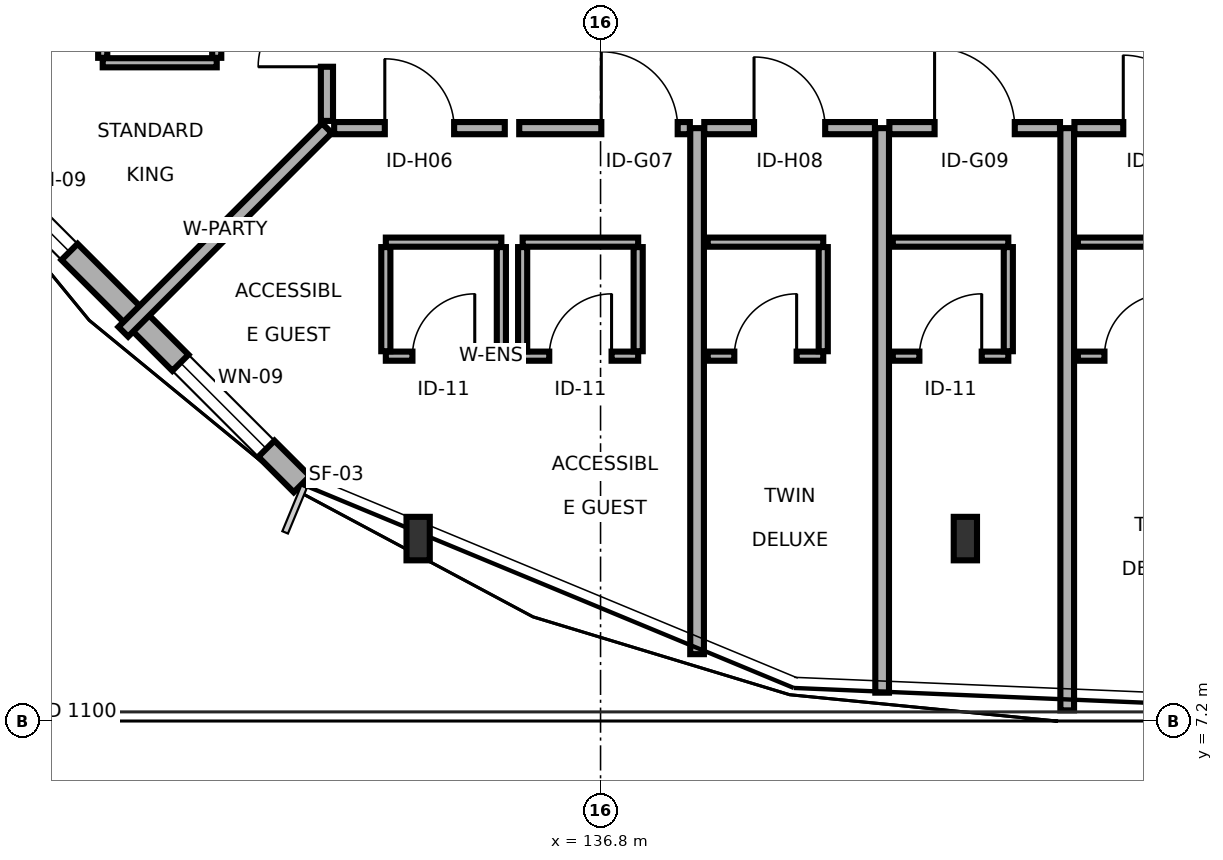
"""IFC4 building model, lengths in metres.
Left out: names, types, materials, properties, quantities, classifications, styles, units other than length and angle.
Written with IfcOpenShell. Run it as: python <this file> out.ifc"""

import sys

from ifc_helpers import new_model, si_unit, direction, frame, frame_2d, origin, origin_2d, place, context, subcontext, project, spatial, rectangle, i_section, extrude, element, fill, save


model = new_model("IFC4")
c1 = context("Model", 3, precision=1e-05, world=origin(), true_north=direction((0.0, 1.0)))
c2 = subcontext(c1, "Body", "Model", "MODEL_VIEW")
j1 = project(units=[si_unit("LENGTHUNIT", "METRE"), si_unit("PLANEANGLEUNIT", "RADIAN")], contexts=[c1])
p1 = place(None, origin())
s1 = spatial("IfcSite", under=j1, at=p1, CompositionType="ELEMENT")
p2 = place(p1, origin())
s2 = spatial("IfcBuilding", under=s1, at=p2, CompositionType="ELEMENT")
p3 = place(p2, frame((0.0, 0.0, 14.7)))
s3 = spatial("IfcBuildingStorey", under=s2, at=p3, CompositionType="ELEMENT", Elevation=14.7)
for number, where, z_axis, x_axis in (
    (1, (134.4, 9.6, 0.0), (0.0, 0.0, 1.0), (1.0, 0.0, 0.0)),
    (2, (141.6, 9.6, 0.0), (0.0, 0.0, 1.0), (1.0, 0.0, 0.0)),
):
    element("IfcColumn", number, at=place(p3, frame(where, z_axis=z_axis, x_axis=x_axis)), inside=s3, PredefinedType="COLUMN", context=c2, shape_type="SweptSolid", body=[
        extrude(i_section(OverallWidth=0.306, OverallDepth=0.572, WebThickness=0.021, FlangeThickness=0.04, FilletRadius=0.027, at=origin_2d()), origin(), (0.0, 0.0, 1.0), 3.4),
    ])
p4 = place(p3, frame((127.916, 15.27, 0.0), z_axis=(0.0, 0.0, 1.0), x_axis=(0.707089356394, -0.707124205549, 0.0)))
e3 = element("IfcWall", 3, at=p4, inside=s3, PredefinedType="SOLIDWALL", context=c2, shape_type="SweptSolid", body=[
    extrude(rectangle(XDim=7.006, YDim=0.3, at=frame_2d((3.503, 0.0))), origin(), (0.0, 0.0, 1.0), 3.215),
])
p5 = place(p4, frame((4.746, 0.0, 0.8)))
e4 = element("IfcOpeningElement", 4, at=p5, cuts=e3, PredefinedType="OPENING", context=c2, shape_type="SweptSolid", body=[
    extrude(rectangle(XDim=1.6, YDim=1.5, at=frame_2d((0.8, 0.75))), frame((0.0, 0.16, 0.0), z_axis=(0.0, -1.0, 0.0), x_axis=(1.0, 0.0, 0.0)), (0.0, 0.0, 1.0), 0.32),
])
p6 = place(p4, frame((1.083, 0.0, 0.8)))
e5 = element("IfcOpeningElement", 5, at=p6, cuts=e3, PredefinedType="OPENING", context=c2, shape_type="SweptSolid", body=[
    extrude(rectangle(XDim=1.6, YDim=1.5, at=frame_2d((0.8, 0.75))), frame((0.0, 0.16, 0.0), z_axis=(0.0, -1.0, 0.0), x_axis=(1.0, 0.0, 0.0)), (0.0, 0.0, 1.0), 0.32),
])
p7 = place(p3, frame((133.295, 15.0, 0.0), z_axis=(0.0, 0.0, 1.0), x_axis=(1.0, 0.0, 0.0)))
e6 = element("IfcWall", 6, at=p7, inside=s3, PredefinedType="PARTITIONING", context=c2, shape_type="SweptSolid", body=[
    extrude(rectangle(XDim=2.245, YDim=0.16, at=frame_2d((1.123, 0.0))), origin(), (0.0, 0.0, 1.0), 3.215),
])
p8 = place(p7, frame((0.667, 0.0, 0.0)))
e7 = element("IfcOpeningElement", 7, at=p8, cuts=e6, PredefinedType="OPENING", context=c2, shape_type="SweptSolid", body=[
    extrude(rectangle(XDim=0.912, YDim=2.13, at=frame_2d((0.456, 1.065))), frame((0.0, 0.09, 0.0), z_axis=(0.0, -1.0, 0.0), x_axis=(1.0, 0.0, 0.0)), (0.0, 0.0, 1.0), 0.18),
])
p9 = place(p3, frame((133.975, 12.0, 0.0), z_axis=(0.0, 0.0, 1.0), x_axis=(1.0, 0.0, 0.0)))
e8 = element("IfcWall", 8, at=p9, inside=s3, PredefinedType="PARTITIONING", context=c2, shape_type="SweptSolid", body=[
    extrude(rectangle(XDim=1.52, YDim=0.12, at=frame_2d((0.76, 0.0))), origin(), (0.0, 0.0, 1.0), 2.75),
])
p10 = place(p9, frame((0.35, 0.0, 0.0)))
e9 = element("IfcOpeningElement", 9, at=p10, cuts=e8, PredefinedType="OPENING", context=c2, shape_type="SweptSolid", body=[
    extrude(rectangle(XDim=0.82, YDim=2.08, at=frame_2d((0.41, 1.04))), frame((0.0, 0.07, 0.0), z_axis=(0.0, -1.0, 0.0), x_axis=(1.0, 0.0, 0.0)), (0.0, 0.0, 1.0), 0.14),
])
p11 = place(p3, frame((133.975, 13.5, 0.0), z_axis=(0.0, 0.0, 1.0), x_axis=(1.0, 0.0, 0.0)))
e10 = element("IfcWall", 10, at=p11, inside=s3, PredefinedType="PARTITIONING", context=c2, shape_type="SweptSolid", body=[
    extrude(rectangle(XDim=1.52, YDim=0.12, at=frame_2d((0.76, 0.0))), origin(), (0.0, 0.0, 1.0), 3.215),
])
p12 = place(p3, frame((133.975, 12.065, 0.0), z_axis=(0.0, 0.0, 1.0), x_axis=(0.0, 1.0, 0.0)))
e11 = element("IfcWall", 11, at=p12, inside=s3, PredefinedType="PARTITIONING", context=c2, shape_type="SweptSolid", body=[
    extrude(rectangle(XDim=1.37, YDim=0.12, at=frame_2d((0.685, 0.0))), origin(), (0.0, 0.0, 1.0), 3.215),
])
p13 = place(p3, frame((135.495, 12.065, 0.0), z_axis=(0.0, 0.0, 1.0), x_axis=(0.0, 1.0, 0.0)))
e12 = element("IfcWall", 12, at=p13, inside=s3, PredefinedType="PARTITIONING", context=c2, shape_type="SweptSolid", body=[
    extrude(rectangle(XDim=1.37, YDim=0.12, at=frame_2d((0.685, 0.0))), origin(), (0.0, 0.0, 1.0), 2.75),
])
p14 = place(p3, frame((133.2, 15.0, 0.0), z_axis=(0.0, 0.0, 1.0), x_axis=(-0.707106781187, -0.707106781187, 0.0)))
e13 = element("IfcWall", 13, at=p14, inside=s3, PredefinedType="PARTITIONING", context=c2, shape_type="SweptSolid", body=[
    extrude(rectangle(XDim=3.789, YDim=0.18, at=frame_2d((1.894, 0.0))), origin(), (0.0, 0.0, 1.0), 2.76),
])
p15 = place(p3, frame((135.73, 15.0, 0.0), z_axis=(0.0, 0.0, 1.0), x_axis=(1.0, 0.0, 0.0)))
e14 = element("IfcWall", 14, at=p15, inside=s3, PredefinedType="PARTITIONING", context=c2, shape_type="SweptSolid", body=[
    extrude(rectangle(XDim=2.245, YDim=0.16, at=frame_2d((1.123, 0.0))), origin(), (0.0, 0.0, 1.0), 2.75),
])
p16 = place(p15, frame((1.08, 0.0, 0.0)))
e15 = element("IfcOpeningElement", 15, at=p16, cuts=e14, PredefinedType="OPENING", context=c2, shape_type="SweptSolid", body=[
    extrude(rectangle(XDim=1.005, YDim=2.05, at=frame_2d((0.502, 1.025))), frame((0.0, 0.09, 0.0), z_axis=(0.0, -1.0, 0.0), x_axis=(1.0, 0.0, 0.0)), (0.0, 0.0, 1.0), 0.18),
])
p17 = place(p3, frame((135.775, 12.0, 0.0), z_axis=(0.0, 0.0, 1.0), x_axis=(1.0, 0.0, 0.0)))
e16 = element("IfcWall", 16, at=p17, inside=s3, PredefinedType="PARTITIONING", context=c2, shape_type="SweptSolid", body=[
    extrude(rectangle(XDim=1.52, YDim=0.12, at=frame_2d((0.76, 0.0))), origin(), (0.0, 0.0, 1.0), 3.215),
])
p18 = place(p17, frame((0.35, 0.0, 0.0)))
e17 = element("IfcOpeningElement", 17, at=p18, cuts=e16, PredefinedType="OPENING", context=c2, shape_type="SweptSolid", body=[
    extrude(rectangle(XDim=0.82, YDim=2.08, at=frame_2d((0.41, 1.04))), frame((0.0, 0.07, 0.0), z_axis=(0.0, -1.0, 0.0), x_axis=(1.0, 0.0, 0.0)), (0.0, 0.0, 1.0), 0.14),
])
p19 = place(p3, frame((135.775, 13.5, 0.0), z_axis=(0.0, 0.0, 1.0), x_axis=(1.0, 0.0, 0.0)))
e18 = element("IfcWall", 18, at=p19, inside=s3, PredefinedType="PARTITIONING", context=c2, shape_type="SweptSolid", body=[
    extrude(rectangle(XDim=1.52, YDim=0.12, at=frame_2d((0.76, 0.0))), origin(), (0.0, 0.0, 1.0), 2.75),
])
p20 = place(p3, frame((135.775, 12.065, 0.0), z_axis=(0.0, 0.0, 1.0), x_axis=(0.0, 1.0, 0.0)))
e19 = element("IfcWall", 19, at=p20, inside=s3, PredefinedType="PARTITIONING", context=c2, shape_type="SweptSolid", body=[
    extrude(rectangle(XDim=1.37, YDim=0.12, at=frame_2d((0.685, 0.0))), origin(), (0.0, 0.0, 1.0), 2.75),
])
p21 = place(p3, frame((137.295, 12.065, 0.0), z_axis=(0.0, 0.0, 1.0), x_axis=(0.0, 1.0, 0.0)))
e20 = element("IfcWall", 20, at=p21, inside=s3, PredefinedType="PARTITIONING", context=c2, shape_type="SweptSolid", body=[
    extrude(rectangle(XDim=1.37, YDim=0.12, at=frame_2d((0.685, 0.0))), origin(), (0.0, 0.0, 1.0), 3.215),
])
p22 = place(p3, frame((138.07, 8.08, 0.0), z_axis=(0.0, 0.0, 1.0), x_axis=(0.0, 1.0, 0.0)))
e21 = element("IfcWall", 21, at=p22, inside=s3, PredefinedType="PARTITIONING", context=c2, shape_type="SweptSolid", body=[
    extrude(rectangle(XDim=6.92, YDim=0.18, at=frame_2d((3.46, 0.0))), origin(), (0.0, 0.0, 1.0), 2.76),
])
p23 = place(p3, frame((138.165, 15.0, 0.0), z_axis=(0.0, 0.0, 1.0), x_axis=(1.0, 0.0, 0.0)))
e22 = element("IfcWall", 22, at=p23, inside=s3, PredefinedType="PARTITIONING", context=c2, shape_type="SweptSolid", body=[
    extrude(rectangle(XDim=2.245, YDim=0.16, at=frame_2d((1.123, 0.0))), origin(), (0.0, 0.0, 1.0), 3.215),
])
p24 = place(p23, frame((0.655, 0.0, 0.0)))
e23 = element("IfcOpeningElement", 23, at=p24, cuts=e22, PredefinedType="OPENING", context=c2, shape_type="SweptSolid", body=[
    extrude(rectangle(XDim=0.936, YDim=2.07, at=frame_2d((0.468, 1.035))), frame((0.0, 0.09, 0.0), z_axis=(0.0, -1.0, 0.0), x_axis=(1.0, 0.0, 0.0)), (0.0, 0.0, 1.0), 0.18),
])
p25 = place(p3, frame((138.21, 12.0, 0.0), z_axis=(0.0, 0.0, 1.0), x_axis=(1.0, 0.0, 0.0)))
e24 = element("IfcWall", 24, at=p25, inside=s3, PredefinedType="PARTITIONING", context=c2, shape_type="SweptSolid", body=[
    extrude(rectangle(XDim=1.52, YDim=0.12, at=frame_2d((0.76, 0.0))), origin(), (0.0, 0.0, 1.0), 3.215),
])
p26 = place(p25, frame((0.35, 0.0, 0.0)))
e25 = element("IfcOpeningElement", 25, at=p26, cuts=e24, PredefinedType="OPENING", context=c2, shape_type="SweptSolid", body=[
    extrude(rectangle(XDim=0.82, YDim=2.08, at=frame_2d((0.41, 1.04))), frame((0.0, 0.07, 0.0), z_axis=(0.0, -1.0, 0.0), x_axis=(1.0, 0.0, 0.0)), (0.0, 0.0, 1.0), 0.14),
])
p27 = place(p3, frame((138.21, 13.5, 0.0), z_axis=(0.0, 0.0, 1.0), x_axis=(1.0, 0.0, 0.0)))
e26 = element("IfcWall", 26, at=p27, inside=s3, PredefinedType="PARTITIONING", context=c2, shape_type="SweptSolid", body=[
    extrude(rectangle(XDim=1.52, YDim=0.12, at=frame_2d((0.76, 0.0))), origin(), (0.0, 0.0, 1.0), 3.215),
])
p28 = place(p3, frame((139.73, 12.065, 0.0), z_axis=(0.0, 0.0, 1.0), x_axis=(0.0, 1.0, 0.0)))
e27 = element("IfcWall", 27, at=p28, inside=s3, PredefinedType="PARTITIONING", context=c2, shape_type="SweptSolid", body=[
    extrude(rectangle(XDim=1.37, YDim=0.12, at=frame_2d((0.685, 0.0))), origin(), (0.0, 0.0, 1.0), 3.215),
])
p29 = place(p3, frame((140.505, 7.573, 0.0), z_axis=(0.0, 0.0, 1.0), x_axis=(0.0, 1.0, 0.0)))
e28 = element("IfcWall", 28, at=p29, inside=s3, PredefinedType="PARTITIONING", context=c2, shape_type="SweptSolid", body=[
    extrude(rectangle(XDim=7.427, YDim=0.18, at=frame_2d((3.713, 0.0))), origin(), (0.0, 0.0, 1.0), 2.76),
])
p30 = place(p3, frame((140.6, 15.0, 0.0), z_axis=(0.0, 0.0, 1.0), x_axis=(1.0, 0.0, 0.0)))
e29 = element("IfcWall", 29, at=p30, inside=s3, PredefinedType="PARTITIONING", context=c2, shape_type="SweptSolid", body=[
    extrude(rectangle(XDim=2.245, YDim=0.16, at=frame_2d((1.123, 0.0))), origin(), (0.0, 0.0, 1.0), 2.75),
])
p31 = place(p30, frame((0.595, 0.0, 0.0)))
e30 = element("IfcOpeningElement", 30, at=p31, cuts=e29, PredefinedType="OPENING", context=c2, shape_type="SweptSolid", body=[
    extrude(rectangle(XDim=1.055, YDim=2.05, at=frame_2d((0.527, 1.025))), frame((0.0, 0.09, 0.0), z_axis=(0.0, -1.0, 0.0), x_axis=(1.0, 0.0, 0.0)), (0.0, 0.0, 1.0), 0.18),
])
p32 = place(p3, frame((140.645, 12.0, 0.0), z_axis=(0.0, 0.0, 1.0), x_axis=(1.0, 0.0, 0.0)))
e31 = element("IfcWall", 31, at=p32, inside=s3, PredefinedType="PARTITIONING", context=c2, shape_type="SweptSolid", body=[
    extrude(rectangle(XDim=1.52, YDim=0.12, at=frame_2d((0.76, 0.0))), origin(), (0.0, 0.0, 1.0), 2.75),
])
p33 = place(p32, frame((0.35, 0.0, 0.0)))
e32 = element("IfcOpeningElement", 32, at=p33, cuts=e31, PredefinedType="OPENING", context=c2, shape_type="SweptSolid", body=[
    extrude(rectangle(XDim=0.82, YDim=2.08, at=frame_2d((0.41, 1.04))), frame((0.0, 0.07, 0.0), z_axis=(0.0, -1.0, 0.0), x_axis=(1.0, 0.0, 0.0)), (0.0, 0.0, 1.0), 0.14),
])
p34 = place(p3, frame((140.645, 13.5, 0.0), z_axis=(0.0, 0.0, 1.0), x_axis=(1.0, 0.0, 0.0)))
e33 = element("IfcWall", 33, at=p34, inside=s3, PredefinedType="PARTITIONING", context=c2, shape_type="SweptSolid", body=[
    extrude(rectangle(XDim=1.52, YDim=0.12, at=frame_2d((0.76, 0.0))), origin(), (0.0, 0.0, 1.0), 2.75),
])
p35 = place(p3, frame((142.165, 12.065, 0.0), z_axis=(0.0, 0.0, 1.0), x_axis=(0.0, 1.0, 0.0)))
e34 = element("IfcWall", 34, at=p35, inside=s3, PredefinedType="PARTITIONING", context=c2, shape_type="SweptSolid", body=[
    extrude(rectangle(XDim=1.37, YDim=0.12, at=frame_2d((0.685, 0.0))), origin(), (0.0, 0.0, 1.0), 3.215),
])
p36 = place(p3, frame((142.94, 7.34, 0.0), z_axis=(0.0, 0.0, 1.0), x_axis=(0.0, 1.0, 0.0)))
e35 = element("IfcWall", 35, at=p36, inside=s3, PredefinedType="PARTITIONING", context=c2, shape_type="SweptSolid", body=[
    extrude(rectangle(XDim=7.66, YDim=0.18, at=frame_2d((3.83, 0.0))), origin(), (0.0, 0.0, 1.0), 2.76),
])
p37 = place(p3, frame((143.035, 15.0, 0.0), z_axis=(0.0, 0.0, 1.0), x_axis=(1.0, 0.0, 0.0)))
e36 = element("IfcWall", 36, at=p37, inside=s3, PredefinedType="PARTITIONING", context=c2, shape_type="SweptSolid", body=[
    extrude(rectangle(XDim=2.245, YDim=0.16, at=frame_2d((1.123, 0.0))), origin(), (0.0, 0.0, 1.0), 3.215),
])
p38 = place(p37, frame((0.643, 0.0, 0.0)))
e37 = element("IfcOpeningElement", 37, at=p38, cuts=e36, PredefinedType="OPENING", context=c2, shape_type="SweptSolid", body=[
    extrude(rectangle(XDim=0.96, YDim=2.13, at=frame_2d((0.48, 1.065))), frame((0.0, 0.09, 0.0), z_axis=(0.0, -1.0, 0.0), x_axis=(1.0, 0.0, 0.0)), (0.0, 0.0, 1.0), 0.18),
])
p39 = place(p3, frame((143.08, 12.0, 0.0), z_axis=(0.0, 0.0, 1.0), x_axis=(1.0, 0.0, 0.0)))
e38 = element("IfcWall", 38, at=p39, inside=s3, PredefinedType="PARTITIONING", context=c2, shape_type="SweptSolid", body=[
    extrude(rectangle(XDim=1.52, YDim=0.12, at=frame_2d((0.76, 0.0))), origin(), (0.0, 0.0, 1.0), 3.215),
])
p40 = place(p39, frame((0.35, 0.0, 0.0)))
e39 = element("IfcOpeningElement", 39, at=p40, cuts=e38, PredefinedType="OPENING", context=c2, shape_type="SweptSolid", body=[
    extrude(rectangle(XDim=0.82, YDim=2.08, at=frame_2d((0.41, 1.04))), frame((0.0, 0.07, 0.0), z_axis=(0.0, -1.0, 0.0), x_axis=(1.0, 0.0, 0.0)), (0.0, 0.0, 1.0), 0.14),
])
p41 = place(p3, frame((143.08, 13.5, 0.0), z_axis=(0.0, 0.0, 1.0), x_axis=(1.0, 0.0, 0.0)))
e40 = element("IfcWall", 40, at=p41, inside=s3, PredefinedType="PARTITIONING", context=c2, shape_type="SweptSolid", body=[
    extrude(rectangle(XDim=1.52, YDim=0.12, at=frame_2d((0.76, 0.0))), origin(), (0.0, 0.0, 1.0), 3.215),
])
p42 = place(p3, frame((133.2, 15.095, 0.0), z_axis=(0.0, 0.0, 1.0), x_axis=(0.0, 1.0, 0.0)))
e41 = element("IfcWall", 41, at=p42, inside=s3, PredefinedType="PARTITIONING", context=c2, shape_type="SweptSolid", body=[
    extrude(rectangle(XDim=2.33, YDim=0.16, at=frame_2d((1.165, 0.0))), origin(), (0.0, 0.0, 1.0), 2.75),
])
p43 = place(p42, frame((0.712, 0.0, 0.0)))
e42 = element("IfcOpeningElement", 42, at=p43, cuts=e41, PredefinedType="OPENING", context=c2, shape_type="SweptSolid", body=[
    extrude(rectangle(XDim=0.905, YDim=2.05, at=frame_2d((0.453, 1.025))), frame((0.0, 0.09, 0.0), z_axis=(0.0, -1.0, 0.0), x_axis=(1.0, 0.0, 0.0)), (0.0, 0.0, 1.0), 0.18),
])
p44 = place(p3, frame((130.25, 15.86, 0.0), z_axis=(0.0, 0.0, 1.0), x_axis=(1.0, 0.0, 0.0)))
e43 = element("IfcWall", 43, at=p44, inside=s3, PredefinedType="PARTITIONING", context=c2, shape_type="SweptSolid", body=[
    extrude(rectangle(XDim=1.5, YDim=0.12, at=frame_2d((0.75, 0.0))), origin(), (0.0, 0.0, 1.0), 3.215),
])
p45 = place(p3, frame((130.25, 15.925, 0.0), z_axis=(0.0, 0.0, 1.0), x_axis=(0.0, 1.0, 0.0)))
e44 = element("IfcWall", 44, at=p45, inside=s3, PredefinedType="PARTITIONING", context=c2, shape_type="SweptSolid", body=[
    extrude(rectangle(XDim=1.39, YDim=0.12, at=frame_2d((0.695, 0.0))), origin(), (0.0, 0.0, 1.0), 2.75),
])
p46 = place(p45, frame((0.285, 0.0, 0.0)))
e45 = element("IfcOpeningElement", 45, at=p46, cuts=e44, PredefinedType="OPENING", context=c2, shape_type="SweptSolid", body=[
    extrude(rectangle(XDim=0.82, YDim=2.08, at=frame_2d((0.41, 1.04))), frame((0.0, 0.07, 0.0), z_axis=(0.0, -1.0, 0.0), x_axis=(1.0, 0.0, 0.0)), (0.0, 0.0, 1.0), 0.14),
])
p47 = place(p3, frame((131.75, 15.925, 0.0), z_axis=(0.0, 0.0, 1.0), x_axis=(0.0, 1.0, 0.0)))
e46 = element("IfcWall", 46, at=p47, inside=s3, PredefinedType="PARTITIONING", context=c2, shape_type="SweptSolid", body=[
    extrude(rectangle(XDim=1.39, YDim=0.12, at=frame_2d((0.695, 0.0))), origin(), (0.0, 0.0, 1.0), 2.75),
])
p48 = place(p5, origin())
e47 = element("IfcWindow", 47, at=p48, inside=s3, PartitioningType="SINGLE_PANEL", PredefinedType="WINDOW", context=c2, shape_type="SweptSolid", body=[
    extrude(rectangle(XDim=1.6, YDim=1.5, at=frame_2d((0.8, 0.75))), frame((0.0, 0.03, 0.0), z_axis=(0.0, -1.0, 0.0), x_axis=(1.0, 0.0, 0.0)), (0.0, 0.0, 1.0), 0.06),
])
fill(e4, e47)
p49 = place(p6, origin())
e48 = element("IfcWindow", 48, at=p49, inside=s3, PartitioningType="SINGLE_PANEL", PredefinedType="WINDOW", context=c2, shape_type="SweptSolid", body=[
    extrude(rectangle(XDim=1.6, YDim=1.5, at=frame_2d((0.8, 0.75))), frame((0.0, 0.03, 0.0), z_axis=(0.0, -1.0, 0.0), x_axis=(1.0, 0.0, 0.0)), (0.0, 0.0, 1.0), 0.06),
])
fill(e5, e48)
p50 = place(p8, origin())
e49 = element("IfcDoor", 49, at=p50, inside=s3, OperationType="SINGLE_SWING_LEFT", PredefinedType="DOOR", context=c2, shape_type="SweptSolid", body=[
    extrude(rectangle(XDim=0.912, YDim=2.13, at=frame_2d((0.456, 1.065))), frame((0.0, 0.025, 0.0), z_axis=(0.0, -1.0, 0.0), x_axis=(1.0, 0.0, 0.0)), (0.0, 0.0, 1.0), 0.05),
])
fill(e7, e49)
p51 = place(p10, origin())
e50 = element("IfcDoor", 50, at=p51, inside=s3, OperationType="SINGLE_SWING_RIGHT", PredefinedType="DOOR", context=c2, shape_type="SweptSolid", body=[
    extrude(rectangle(XDim=0.82, YDim=2.08, at=frame_2d((0.41, 1.04))), frame((0.0, 0.025, 0.0), z_axis=(0.0, -1.0, 0.0), x_axis=(1.0, 0.0, 0.0)), (0.0, 0.0, 1.0), 0.05),
])
fill(e9, e50)
p52 = place(p16, origin())
e51 = element("IfcDoor", 51, at=p52, inside=s3, OperationType="SINGLE_SWING_LEFT", PredefinedType="DOOR", context=c2, shape_type="SweptSolid", body=[
    extrude(rectangle(XDim=1.005, YDim=2.05, at=frame_2d((0.502, 1.025))), frame((0.0, 0.025, 0.0), z_axis=(0.0, -1.0, 0.0), x_axis=(1.0, 0.0, 0.0)), (0.0, 0.0, 1.0), 0.05),
])
fill(e15, e51)
p53 = place(p18, origin())
e52 = element("IfcDoor", 52, at=p53, inside=s3, OperationType="SINGLE_SWING_RIGHT", PredefinedType="DOOR", context=c2, shape_type="SweptSolid", body=[
    extrude(rectangle(XDim=0.82, YDim=2.08, at=frame_2d((0.41, 1.04))), frame((0.0, 0.025, 0.0), z_axis=(0.0, -1.0, 0.0), x_axis=(1.0, 0.0, 0.0)), (0.0, 0.0, 1.0), 0.05),
])
fill(e17, e52)
p54 = place(p24, origin())
e53 = element("IfcDoor", 53, at=p54, inside=s3, OperationType="SINGLE_SWING_LEFT", PredefinedType="DOOR", context=c2, shape_type="SweptSolid", body=[
    extrude(rectangle(XDim=0.936, YDim=2.07, at=frame_2d((0.468, 1.035))), frame((0.0, 0.025, 0.0), z_axis=(0.0, -1.0, 0.0), x_axis=(1.0, 0.0, 0.0)), (0.0, 0.0, 1.0), 0.05),
])
fill(e23, e53)
p55 = place(p26, origin())
e54 = element("IfcDoor", 54, at=p55, inside=s3, OperationType="SINGLE_SWING_RIGHT", PredefinedType="DOOR", context=c2, shape_type="SweptSolid", body=[
    extrude(rectangle(XDim=0.82, YDim=2.08, at=frame_2d((0.41, 1.04))), frame((0.0, 0.025, 0.0), z_axis=(0.0, -1.0, 0.0), x_axis=(1.0, 0.0, 0.0)), (0.0, 0.0, 1.0), 0.05),
])
fill(e25, e54)
p56 = place(p31, origin())
e55 = element("IfcDoor", 55, at=p56, inside=s3, OperationType="SINGLE_SWING_LEFT", PredefinedType="DOOR", context=c2, shape_type="SweptSolid", body=[
    extrude(rectangle(XDim=1.055, YDim=2.05, at=frame_2d((0.527, 1.025))), frame((0.0, 0.025, 0.0), z_axis=(0.0, -1.0, 0.0), x_axis=(1.0, 0.0, 0.0)), (0.0, 0.0, 1.0), 0.05),
])
fill(e30, e55)
p57 = place(p33, origin())
e56 = element("IfcDoor", 56, at=p57, inside=s3, OperationType="SINGLE_SWING_RIGHT", PredefinedType="DOOR", context=c2, shape_type="SweptSolid", body=[
    extrude(rectangle(XDim=0.82, YDim=2.08, at=frame_2d((0.41, 1.04))), frame((0.0, 0.025, 0.0), z_axis=(0.0, -1.0, 0.0), x_axis=(1.0, 0.0, 0.0)), (0.0, 0.0, 1.0), 0.05),
])
fill(e32, e56)
p58 = place(p38, origin())
e57 = element("IfcDoor", 57, at=p58, inside=s3, OperationType="SINGLE_SWING_LEFT", PredefinedType="DOOR", context=c2, shape_type="SweptSolid", body=[
    extrude(rectangle(XDim=0.96, YDim=2.13, at=frame_2d((0.48, 1.065))), frame((0.0, 0.025, 0.0), z_axis=(0.0, -1.0, 0.0), x_axis=(1.0, 0.0, 0.0)), (0.0, 0.0, 1.0), 0.05),
])
fill(e37, e57)
p59 = place(p40, origin())
e58 = element("IfcDoor", 58, at=p59, inside=s3, OperationType="SINGLE_SWING_RIGHT", PredefinedType="DOOR", context=c2, shape_type="SweptSolid", body=[
    extrude(rectangle(XDim=0.82, YDim=2.08, at=frame_2d((0.41, 1.04))), frame((0.0, 0.025, 0.0), z_axis=(0.0, -1.0, 0.0), x_axis=(1.0, 0.0, 0.0)), (0.0, 0.0, 1.0), 0.05),
])
fill(e39, e58)
p60 = place(p43, origin())
e59 = element("IfcDoor", 59, at=p60, inside=s3, OperationType="SINGLE_SWING_LEFT", PredefinedType="DOOR", context=c2, shape_type="SweptSolid", body=[
    extrude(rectangle(XDim=0.905, YDim=2.05, at=frame_2d((0.453, 1.025))), frame((0.0, 0.025, 0.0), z_axis=(0.0, -1.0, 0.0), x_axis=(1.0, 0.0, 0.0)), (0.0, 0.0, 1.0), 0.05),
])
fill(e42, e59)
save(model, sys.argv[1])
